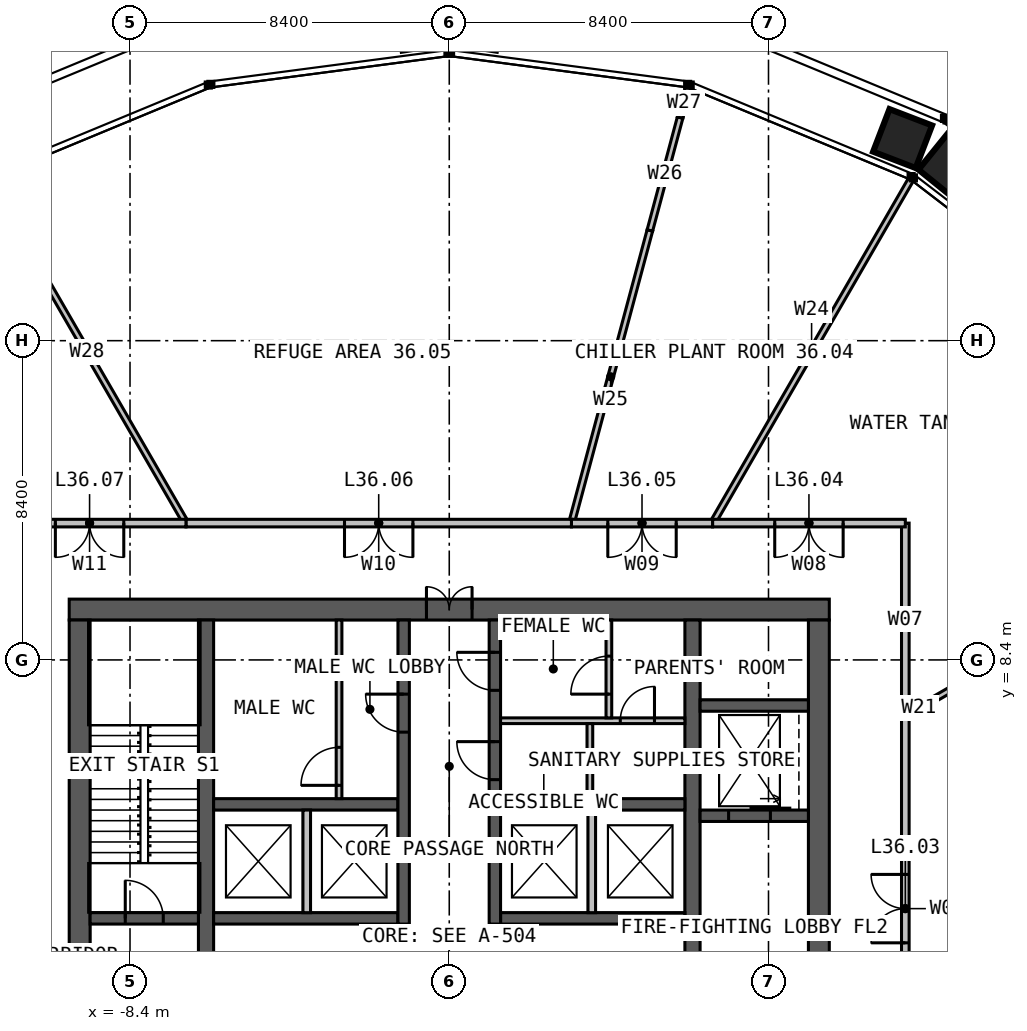
"""IFC4 building model, lengths in metres.
Left out: names, types, materials, properties, quantities, classifications, styles, units other than length and angle.
Written with IfcOpenShell. Run it as: python <this file> out.ifc"""

import sys

from ifc_helpers import new_model, si_unit, direction, frame, frame_2d, origin, place, context, subcontext, project, spatial, rectangle, extrude, element, fill, save


model = new_model("IFC4")
c1 = context("Model", 3, precision=1e-05, world=origin(), true_north=direction((0.0, 1.0)))
c2 = subcontext(c1, "Body", "Model", "MODEL_VIEW")
j1 = project(units=[si_unit("LENGTHUNIT", "METRE"), si_unit("PLANEANGLEUNIT", "RADIAN")], contexts=[c1])
p1 = place(None, origin())
s1 = spatial("IfcSite", under=j1, at=p1, CompositionType="ELEMENT")
p2 = place(p1, origin())
s2 = spatial("IfcBuilding", under=s1, at=p2, CompositionType="ELEMENT")
p3 = place(p2, frame((0.0, 0.0, 150.0)))
s3 = spatial("IfcBuildingStorey", under=s2, at=p3, CompositionType="ELEMENT", Elevation=150.0)
p4 = place(p3, frame((-10.0, 9.725, 0.0), z_axis=(0.0, 0.0, 1.0), x_axis=(1.0, 0.0, 0.0)))
e1 = element("IfcWall", 1, at=p4, inside=s3, PredefinedType="SOLIDWALL", context=c2, shape_type="SweptSolid", body=[
    extrude(rectangle(XDim=20.0, YDim=0.55, at=frame_2d((10.0, 0.0))), origin(), (0.0, 0.0, 1.0), 5.0),
])
p5 = place(p4, frame((9.4, 0.0, 0.0)))
e2 = element("IfcOpeningElement", 2, at=p5, cuts=e1, PredefinedType="OPENING", context=c2, shape_type="SweptSolid", body=[
    extrude(rectangle(XDim=1.2, YDim=2.2, at=frame_2d((0.6, 1.1))), frame((0.0, 0.285, 0.0), z_axis=(0.0, -1.0, 0.0), x_axis=(1.0, 0.0, 0.0)), (0.0, 0.0, 1.0), 0.57),
])
for number, where, z_axis, x_axis in (
    (3, (9.725, -9.45, 0.0), (0.0, 0.0, 1.0), (0.0, 1.0, 0.0)),
    (4, (-9.725, 9.45, 0.0), (0.0, 0.0, 1.0), (0.0, -1.0, 0.0)),
):
    element("IfcWall", number, at=place(p3, frame(where, z_axis=z_axis, x_axis=x_axis)), inside=s3, PredefinedType="SOLIDWALL", context=c2, shape_type="SweptSolid", body=[
        extrude(rectangle(XDim=18.9, YDim=0.55, at=frame_2d((9.45, 0.0))), origin(), (0.0, 0.0, 1.0), 5.0),
    ])
p6 = place(p3, frame((-6.4, -9.45, 0.0), z_axis=(0.0, 0.0, 1.0), x_axis=(0.0, 1.0, 0.0)))
e5 = element("IfcWall", 5, at=p6, inside=s3, PredefinedType="SOLIDWALL", context=c2, shape_type="SweptSolid", body=[
    extrude(rectangle(XDim=18.9, YDim=0.4, at=frame_2d((9.45, 0.0))), origin(), (0.0, 0.0, 1.0), 5.0),
])
p7 = place(p6, frame((8.95, 0.0, 0.0)))
e6 = element("IfcOpeningElement", 6, at=p7, cuts=e5, PredefinedType="OPENING", context=c2, shape_type="SweptSolid", body=[
    extrude(rectangle(XDim=1.0, YDim=2.2, at=frame_2d((0.5, 1.1))), frame((0.0, 0.21, 0.0), z_axis=(0.0, -1.0, 0.0), x_axis=(1.0, 0.0, 0.0)), (0.0, 0.0, 1.0), 0.42),
])
p8 = place(p3, frame((6.4, 9.45, 0.0), z_axis=(0.0, 0.0, 1.0), x_axis=(0.0, -1.0, 0.0)))
e7 = element("IfcWall", 7, at=p8, inside=s3, PredefinedType="SOLIDWALL", context=c2, shape_type="SweptSolid", body=[
    extrude(rectangle(XDim=18.9, YDim=0.4, at=frame_2d((9.45, 0.0))), origin(), (0.0, 0.0, 1.0), 5.0),
])
p9 = place(p8, frame((8.95, 0.0, 0.0)))
e8 = element("IfcOpeningElement", 8, at=p9, cuts=e7, PredefinedType="OPENING", context=c2, shape_type="SweptSolid", body=[
    extrude(rectangle(XDim=1.0, YDim=2.2, at=frame_2d((0.5, 1.1))), frame((0.0, 0.21, 0.0), z_axis=(0.0, -1.0, 0.0), x_axis=(1.0, 0.0, 0.0)), (0.0, 0.0, 1.0), 0.42),
])
for number, where, z_axis, x_axis in (
    (9, (-6.2, 1.6, 0.0), (0.0, 0.0, 1.0), (1.0, 0.0, 0.0)),
    (10, (1.35, 1.6, 0.0), (0.0, 0.0, 1.0), (1.0, 0.0, 0.0)),
    (11, (-6.2, 4.6, 0.0), (0.0, 0.0, 1.0), (1.0, 0.0, 0.0)),
    (12, (1.35, 4.6, 0.0), (0.0, 0.0, 1.0), (1.0, 0.0, 0.0)),
):
    element("IfcWall", number, at=place(p3, frame(where, z_axis=z_axis, x_axis=x_axis)), inside=s3, PredefinedType="SOLIDWALL", context=c2, shape_type="SweptSolid", body=[
        extrude(rectangle(XDim=4.85, YDim=0.3, at=frame_2d((2.425, 0.0))), origin(), (0.0, 0.0, 1.0), 5.0),
    ])
p10 = place(p3, frame((-1.2, 1.45, 0.0), z_axis=(0.0, 0.0, 1.0), x_axis=(0.0, 1.0, 0.0)))
e13 = element("IfcWall", 13, at=p10, inside=s3, PredefinedType="SOLIDWALL", context=c2, shape_type="SweptSolid", body=[
    extrude(rectangle(XDim=8.0, YDim=0.3, at=frame_2d((4.0, 0.0))), origin(), (0.0, 0.0, 1.0), 5.0),
])
p11 = place(p10, frame((5.05, 0.0, 0.0)))
e14 = element("IfcOpeningElement", 14, at=p11, cuts=e13, PredefinedType="OPENING", context=c2, shape_type="SweptSolid", body=[
    extrude(rectangle(XDim=1.0, YDim=2.2, at=frame_2d((0.5, 1.1))), frame((0.0, 0.16, 0.0), z_axis=(0.0, -1.0, 0.0), x_axis=(1.0, 0.0, 0.0)), (0.0, 0.0, 1.0), 0.32),
])
p12 = place(p3, frame((1.2, 1.45, 0.0), z_axis=(0.0, 0.0, 1.0), x_axis=(0.0, 1.0, 0.0)))
e15 = element("IfcWall", 15, at=p12, inside=s3, PredefinedType="SOLIDWALL", context=c2, shape_type="SweptSolid", body=[
    extrude(rectangle(XDim=8.0, YDim=0.3, at=frame_2d((4.0, 0.0))), origin(), (0.0, 0.0, 1.0), 5.0),
])
p13 = place(p12, frame((3.8, 0.0, 0.0)))
e16 = element("IfcOpeningElement", 16, at=p13, cuts=e15, PredefinedType="OPENING", context=c2, shape_type="SweptSolid", body=[
    extrude(rectangle(XDim=1.0, YDim=2.2, at=frame_2d((0.5, 1.1))), frame((0.0, 0.16, 0.0), z_axis=(0.0, -1.0, 0.0), x_axis=(1.0, 0.0, 0.0)), (0.0, 0.0, 1.0), 0.32),
])
p14 = place(p12, frame((6.15, 0.0, 0.0)))
e17 = element("IfcOpeningElement", 17, at=p14, cuts=e15, PredefinedType="OPENING", context=c2, shape_type="SweptSolid", body=[
    extrude(rectangle(XDim=1.0, YDim=2.2, at=frame_2d((0.5, 1.1))), frame((0.0, 0.16, 0.0), z_axis=(0.0, -1.0, 0.0), x_axis=(1.0, 0.0, 0.0)), (0.0, 0.0, 1.0), 0.32),
])
p15 = place(p3, frame((-9.45, 1.6, 0.0), z_axis=(0.0, 0.0, 1.0), x_axis=(1.0, 0.0, 0.0)))
e18 = element("IfcWall", 18, at=p15, inside=s3, PredefinedType="SOLIDWALL", context=c2, shape_type="SweptSolid", body=[
    extrude(rectangle(XDim=2.85, YDim=0.3, at=frame_2d((1.425, 0.0))), origin(), (0.0, 0.0, 1.0), 5.0),
])
p16 = place(p15, frame((0.925, 0.0, 0.0)))
e19 = element("IfcOpeningElement", 19, at=p16, cuts=e18, PredefinedType="OPENING", context=c2, shape_type="SweptSolid", body=[
    extrude(rectangle(XDim=1.0, YDim=2.2, at=frame_2d((0.5, 1.1))), frame((0.0, 0.16, 0.0), z_axis=(0.0, -1.0, 0.0), x_axis=(1.0, 0.0, 0.0)), (0.0, 0.0, 1.0), 0.32),
])
p17 = place(p3, frame((6.6, 4.3, 0.0), z_axis=(0.0, 0.0, 1.0), x_axis=(1.0, 0.0, 0.0)))
e20 = element("IfcWall", 20, at=p17, inside=s3, PredefinedType="SOLIDWALL", context=c2, shape_type="SweptSolid", body=[
    extrude(rectangle(XDim=2.85, YDim=0.3, at=frame_2d((1.425, 0.0))), origin(), (0.0, 0.0, 1.0), 5.0),
])
p18 = place(p17, frame((0.75, 0.0, 0.0)))
e21 = element("IfcOpeningElement", 21, at=p18, cuts=e20, PredefinedType="OPENING", context=c2, shape_type="SweptSolid", body=[
    extrude(rectangle(XDim=1.1, YDim=2.2, at=frame_2d((0.55, 1.1))), frame((0.0, 0.16, 0.0), z_axis=(0.0, -1.0, 0.0), x_axis=(1.0, 0.0, 0.0)), (0.0, 0.0, 1.0), 0.32),
])
p19 = place(p3, frame((6.6, 7.2, 0.0), z_axis=(0.0, 0.0, 1.0), x_axis=(1.0, 0.0, 0.0)))
e22 = element("IfcWall", 22, at=p19, inside=s3, PredefinedType="SOLIDWALL", context=c2, shape_type="SweptSolid", body=[
    extrude(rectangle(XDim=2.85, YDim=0.3, at=frame_2d((1.425, 0.0))), origin(), (0.0, 0.0, 1.0), 5.0),
])
for number, where, z_axis, x_axis in (
    (23, (-3.75, 1.75, 0.0), (0.0, 0.0, 1.0), (0.0, 1.0, 0.0)),
    (24, (3.75, 1.75, 0.0), (0.0, 0.0, 1.0), (0.0, 1.0, 0.0)),
):
    element("IfcWall", number, at=place(p3, frame(where, z_axis=z_axis, x_axis=x_axis)), inside=s3, PredefinedType="SOLIDWALL", context=c2, shape_type="SweptSolid", body=[
        extrude(rectangle(XDim=2.7, YDim=0.2, at=frame_2d((1.35, 0.0))), origin(), (0.0, 0.0, 1.0), 4.75),
    ])
p20 = place(p3, frame((1.35, 6.8, 0.0), z_axis=(0.0, 0.0, 1.0), x_axis=(1.0, 0.0, 0.0)))
e25 = element("IfcWall", 25, at=p20, inside=s3, PredefinedType="PARTITIONING", context=c2, shape_type="SweptSolid", body=[
    extrude(rectangle(XDim=4.85, YDim=0.15, at=frame_2d((2.425, 0.0))), origin(), (0.0, 0.0, 1.0), 4.75),
])
p21 = place(p20, frame((3.15, 0.0, 0.0)))
e26 = element("IfcOpeningElement", 26, at=p21, cuts=e25, PredefinedType="OPENING", context=c2, shape_type="SweptSolid", body=[
    extrude(rectangle(XDim=0.9, YDim=2.2, at=frame_2d((0.45, 1.1))), frame((0.0, 0.085, 0.0), z_axis=(0.0, -1.0, 0.0), x_axis=(1.0, 0.0, 0.0)), (0.0, 0.0, 1.0), 0.17),
])
p22 = place(p3, frame((3.7, 4.75, 0.0), z_axis=(0.0, 0.0, 1.0), x_axis=(0.0, 1.0, 0.0)))
e27 = element("IfcWall", 27, at=p22, inside=s3, PredefinedType="PARTITIONING", context=c2, shape_type="SweptSolid", body=[
    extrude(rectangle(XDim=1.975, YDim=0.15, at=frame_2d((0.988, 0.0))), origin(), (0.0, 0.0, 1.0), 4.75),
])
p23 = place(p3, frame((4.2, 6.875, 0.0), z_axis=(0.0, 0.0, 1.0), x_axis=(0.0, 1.0, 0.0)))
e28 = element("IfcWall", 28, at=p23, inside=s3, PredefinedType="PARTITIONING", context=c2, shape_type="SweptSolid", body=[
    extrude(rectangle(XDim=2.575, YDim=0.15, at=frame_2d((1.288, 0.0))), origin(), (0.0, 0.0, 1.0), 4.75),
])
p24 = place(p23, frame((0.625, 0.0, 0.0)))
e29 = element("IfcOpeningElement", 29, at=p24, cuts=e28, PredefinedType="OPENING", context=c2, shape_type="SweptSolid", body=[
    extrude(rectangle(XDim=1.0, YDim=2.2, at=frame_2d((0.5, 1.1))), frame((0.0, 0.085, 0.0), z_axis=(0.0, -1.0, 0.0), x_axis=(1.0, 0.0, 0.0)), (0.0, 0.0, 1.0), 0.17),
])
p25 = place(p3, frame((-2.9, 4.75, 0.0), z_axis=(0.0, 0.0, 1.0), x_axis=(0.0, 1.0, 0.0)))
e30 = element("IfcWall", 30, at=p25, inside=s3, PredefinedType="PARTITIONING", context=c2, shape_type="SweptSolid", body=[
    extrude(rectangle(XDim=4.7, YDim=0.15, at=frame_2d((2.35, 0.0))), origin(), (0.0, 0.0, 1.0), 4.75),
])
p26 = place(p25, frame((0.35, 0.0, 0.0)))
e31 = element("IfcOpeningElement", 31, at=p26, cuts=e30, PredefinedType="OPENING", context=c2, shape_type="SweptSolid", body=[
    extrude(rectangle(XDim=1.0, YDim=2.2, at=frame_2d((0.5, 1.1))), frame((0.0, 0.085, 0.0), z_axis=(0.0, -1.0, 0.0), x_axis=(1.0, 0.0, 0.0)), (0.0, 0.0, 1.0), 0.17),
])
p27 = place(p3, frame((12.0, 6.928, 0.0), z_axis=(0.0, 0.0, 1.0), x_axis=(0.86608282171, 0.499900536046, 0.0)))
e32 = element("IfcWall", 32, at=p27, inside=s3, PredefinedType="PARTITIONING", context=c2, shape_type="SweptSolid", body=[
    extrude(rectangle(XDim=0.831, YDim=0.15, at=frame_2d((0.416, 0.0))), origin(), (0.0, 0.0, 1.0), 4.8),
])
p28 = place(p3, frame((12.719, 7.344, 0.0), z_axis=(0.0, 0.0, 1.0), x_axis=(0.866002361659, 0.500039908008, 0.0)))
e33 = element("IfcWall", 33, at=p28, inside=s3, PredefinedType="PARTITIONING", context=c2, shape_type="SweptSolid", body=[
    extrude(rectangle(XDim=2.618, YDim=0.15, at=frame_2d((1.309, 0.0))), origin(), (0.0, 0.0, 1.0), 3.79),
])
p29 = place(p3, frame((6.928, 12.0, 0.0), z_axis=(0.0, 0.0, 1.0), x_axis=(0.500003616288, 0.866023315909, 0.0)))
e34 = element("IfcWall", 34, at=p29, inside=s3, PredefinedType="PARTITIONING", context=c2, shape_type="SweptSolid", body=[
    extrude(rectangle(XDim=10.423, YDim=0.15, at=frame_2d((5.211, 0.0))), origin(), (0.0, 0.0, 1.0), 4.8),
])
p30 = place(p3, frame((3.215, 12.0, 0.0), z_axis=(0.0, 0.0, 1.0), x_axis=(0.258826894995, 0.965923722882, 0.0)))
e35 = element("IfcWall", 35, at=p30, inside=s3, PredefinedType="PARTITIONING", context=c2, shape_type="SweptSolid", body=[
    extrude(rectangle(XDim=7.973, YDim=0.15, at=frame_2d((3.987, 0.0))), origin(), (0.0, 0.0, 1.0), 4.8),
])
p31 = place(p3, frame((5.279, 19.702, 0.0), z_axis=(0.0, 0.0, 1.0), x_axis=(0.258819472716, 0.96592571171, 0.0)))
e36 = element("IfcWall", 36, at=p31, inside=s3, PredefinedType="PARTITIONING", context=c2, shape_type="SweptSolid", body=[
    extrude(rectangle(XDim=3.073, YDim=0.15, at=frame_2d((1.537, 0.0))), origin(), (0.0, 0.0, 1.0), 3.79),
])
p32 = place(p3, frame((6.074, 22.67, 0.0), z_axis=(0.0, 0.0, 1.0), x_axis=(0.258826555959, 0.96592381373, 0.0)))
e37 = element("IfcWall", 37, at=p32, inside=s3, PredefinedType="PARTITIONING", context=c2, shape_type="SweptSolid", body=[
    extrude(rectangle(XDim=0.809, YDim=0.15, at=frame_2d((0.405, 0.0))), origin(), (0.0, 0.0, 1.0), 4.8),
])
p33 = place(p3, frame((-6.928, 12.0, 0.0), z_axis=(0.0, 0.0, 1.0), x_axis=(-0.500003616288, 0.866023315909, 0.0)))
e38 = element("IfcWall", 38, at=p33, inside=s3, PredefinedType="PARTITIONING", context=c2, shape_type="SweptSolid", body=[
    extrude(rectangle(XDim=10.423, YDim=0.15, at=frame_2d((5.211, 0.0))), origin(), (0.0, 0.0, 1.0), 4.8),
])
p34 = place(p3, frame((12.0, -3.215, 0.0), z_axis=(0.0, 0.0, 1.0), x_axis=(0.0, 1.0, 0.0)))
e39 = element("IfcWall", 39, at=p34, inside=s3, PredefinedType="PARTITIONING", context=c2, shape_type="SweptSolid", body=[
    extrude(rectangle(XDim=10.144, YDim=0.2, at=frame_2d((5.072, 0.0))), origin(), (0.0, 0.0, 1.0), 4.8),
])
p35 = place(p34, frame((4.172, 0.0, 0.0)))
e40 = element("IfcOpeningElement", 40, at=p35, cuts=e39, PredefinedType="OPENING", context=c2, shape_type="SweptSolid", body=[
    extrude(rectangle(XDim=1.8, YDim=2.2, at=frame_2d((0.9, 1.1))), frame((0.0, 0.11, 0.0), z_axis=(0.0, -1.0, 0.0), x_axis=(1.0, 0.0, 0.0)), (0.0, 0.0, 1.0), 0.22),
])
p36 = place(p3, frame((12.0, 6.928, 0.0), z_axis=(0.0, 0.0, 1.0), x_axis=(0.0, 1.0, 0.0)))
e41 = element("IfcWall", 41, at=p36, inside=s3, PredefinedType="PARTITIONING", context=c2, shape_type="SweptSolid", body=[
    extrude(rectangle(XDim=5.072, YDim=0.2, at=frame_2d((2.536, 0.0))), origin(), (0.0, 0.0, 1.0), 4.8),
])
p37 = place(p3, frame((12.0, 12.0, 0.0), z_axis=(0.0, 0.0, 1.0), x_axis=(-1.0, 0.0, 0.0)))
e42 = element("IfcWall", 42, at=p37, inside=s3, PredefinedType="PARTITIONING", context=c2, shape_type="SweptSolid", body=[
    extrude(rectangle(XDim=5.072, YDim=0.2, at=frame_2d((2.536, 0.0))), origin(), (0.0, 0.0, 1.0), 4.8),
])
p38 = place(p37, frame((1.636, 0.0, 0.0)))
e43 = element("IfcOpeningElement", 43, at=p38, cuts=e42, PredefinedType="OPENING", context=c2, shape_type="SweptSolid", body=[
    extrude(rectangle(XDim=1.8, YDim=2.2, at=frame_2d((0.9, 1.1))), frame((0.0, 0.11, 0.0), z_axis=(0.0, -1.0, 0.0), x_axis=(1.0, 0.0, 0.0)), (0.0, 0.0, 1.0), 0.22),
])
p39 = place(p3, frame((6.928, 12.0, 0.0), z_axis=(0.0, 0.0, 1.0), x_axis=(-1.0, 0.0, 0.0)))
e44 = element("IfcWall", 44, at=p39, inside=s3, PredefinedType="PARTITIONING", context=c2, shape_type="SweptSolid", body=[
    extrude(rectangle(XDim=3.713, YDim=0.2, at=frame_2d((1.856, 0.0))), origin(), (0.0, 0.0, 1.0), 4.8),
])
p40 = place(p39, frame((0.956, 0.0, 0.0)))
e45 = element("IfcOpeningElement", 45, at=p40, cuts=e44, PredefinedType="OPENING", context=c2, shape_type="SweptSolid", body=[
    extrude(rectangle(XDim=1.8, YDim=2.2, at=frame_2d((0.9, 1.1))), frame((0.0, 0.11, 0.0), z_axis=(0.0, -1.0, 0.0), x_axis=(1.0, 0.0, 0.0)), (0.0, 0.0, 1.0), 0.22),
])
p41 = place(p3, frame((3.215, 12.0, 0.0), z_axis=(0.0, 0.0, 1.0), x_axis=(-1.0, 0.0, 0.0)))
e46 = element("IfcWall", 46, at=p41, inside=s3, PredefinedType="PARTITIONING", context=c2, shape_type="SweptSolid", body=[
    extrude(rectangle(XDim=10.144, YDim=0.2, at=frame_2d((5.072, 0.0))), origin(), (0.0, 0.0, 1.0), 4.8),
])
p42 = place(p41, frame((4.172, 0.0, 0.0)))
e47 = element("IfcOpeningElement", 47, at=p42, cuts=e46, PredefinedType="OPENING", context=c2, shape_type="SweptSolid", body=[
    extrude(rectangle(XDim=1.8, YDim=2.2, at=frame_2d((0.9, 1.1))), frame((0.0, 0.11, 0.0), z_axis=(0.0, -1.0, 0.0), x_axis=(1.0, 0.0, 0.0)), (0.0, 0.0, 1.0), 0.22),
])
p43 = place(p3, frame((-6.928, 12.0, 0.0), z_axis=(0.0, 0.0, 1.0), x_axis=(-1.0, 0.0, 0.0)))
e48 = element("IfcWall", 48, at=p43, inside=s3, PredefinedType="PARTITIONING", context=c2, shape_type="SweptSolid", body=[
    extrude(rectangle(XDim=5.072, YDim=0.2, at=frame_2d((2.536, 0.0))), origin(), (0.0, 0.0, 1.0), 4.8),
])
p44 = place(p43, frame((1.636, 0.0, 0.0)))
e49 = element("IfcOpeningElement", 49, at=p44, cuts=e48, PredefinedType="OPENING", context=c2, shape_type="SweptSolid", body=[
    extrude(rectangle(XDim=1.8, YDim=2.2, at=frame_2d((0.9, 1.1))), frame((0.0, 0.11, 0.0), z_axis=(0.0, -1.0, 0.0), x_axis=(1.0, 0.0, 0.0)), (0.0, 0.0, 1.0), 0.22),
])
p45 = place(p5, origin())
e50 = element("IfcDoor", 50, at=p45, inside=s3, OperationType="DOUBLE_DOOR_SINGLE_SWING", PredefinedType="DOOR", context=c2, shape_type="SweptSolid", body=[
    extrude(rectangle(XDim=1.2, YDim=2.2, at=frame_2d((0.6, 1.1))), frame((0.0, 0.025, 0.0), z_axis=(0.0, -1.0, 0.0), x_axis=(1.0, 0.0, 0.0)), (0.0, 0.0, 1.0), 0.05),
])
fill(e2, e50)
p46 = place(p16, origin())
e51 = element("IfcDoor", 51, at=p46, inside=s3, OperationType="SINGLE_SWING_LEFT", PredefinedType="DOOR", context=c2, shape_type="SweptSolid", body=[
    extrude(rectangle(XDim=1.0, YDim=2.2, at=frame_2d((0.5, 1.1))), frame((0.0, 0.025, 0.0), z_axis=(0.0, -1.0, 0.0), x_axis=(1.0, 0.0, 0.0)), (0.0, 0.0, 1.0), 0.05),
])
fill(e19, e51)
p47 = place(p11, origin())
e52 = element("IfcDoor", 52, at=p47, inside=s3, OperationType="SINGLE_SWING_RIGHT", PredefinedType="DOOR", context=c2, shape_type="SweptSolid", body=[
    extrude(rectangle(XDim=1.0, YDim=2.2, at=frame_2d((0.5, 1.1))), frame((0.0, 0.025, 0.0), z_axis=(0.0, -1.0, 0.0), x_axis=(1.0, 0.0, 0.0)), (0.0, 0.0, 1.0), 0.05),
])
fill(e14, e52)
p48 = place(p13, origin())
e53 = element("IfcDoor", 53, at=p48, inside=s3, OperationType="SINGLE_SWING_RIGHT", PredefinedType="DOOR", context=c2, shape_type="SweptSolid", body=[
    extrude(rectangle(XDim=1.0, YDim=2.2, at=frame_2d((0.5, 1.1))), frame((0.0, 0.025, 0.0), z_axis=(0.0, -1.0, 0.0), x_axis=(1.0, 0.0, 0.0)), (0.0, 0.0, 1.0), 0.05),
])
fill(e16, e53)
p49 = place(p14, origin())
e54 = element("IfcDoor", 54, at=p49, inside=s3, OperationType="SINGLE_SWING_RIGHT", PredefinedType="DOOR", context=c2, shape_type="SweptSolid", body=[
    extrude(rectangle(XDim=1.0, YDim=2.2, at=frame_2d((0.5, 1.1))), frame((0.0, 0.025, 0.0), z_axis=(0.0, -1.0, 0.0), x_axis=(1.0, 0.0, 0.0)), (0.0, 0.0, 1.0), 0.05),
])
fill(e17, e54)
p50 = place(p21, origin())
e55 = element("IfcDoor", 55, at=p50, inside=s3, OperationType="SINGLE_SWING_RIGHT", PredefinedType="DOOR", context=c2, shape_type="SweptSolid", body=[
    extrude(rectangle(XDim=0.9, YDim=2.2, at=frame_2d((0.45, 1.1))), frame((0.0, 0.025, 0.0), z_axis=(0.0, -1.0, 0.0), x_axis=(1.0, 0.0, 0.0)), (0.0, 0.0, 1.0), 0.05),
])
fill(e26, e55)
p51 = place(p24, origin())
e56 = element("IfcDoor", 56, at=p51, inside=s3, OperationType="SINGLE_SWING_LEFT", PredefinedType="DOOR", context=c2, shape_type="SweptSolid", body=[
    extrude(rectangle(XDim=1.0, YDim=2.2, at=frame_2d((0.5, 1.1))), frame((0.0, 0.025, 0.0), z_axis=(0.0, -1.0, 0.0), x_axis=(1.0, 0.0, 0.0)), (0.0, 0.0, 1.0), 0.05),
])
fill(e29, e56)
p52 = place(p26, origin())
e57 = element("IfcDoor", 57, at=p52, inside=s3, OperationType="SINGLE_SWING_LEFT", PredefinedType="DOOR", context=c2, shape_type="SweptSolid", body=[
    extrude(rectangle(XDim=1.0, YDim=2.2, at=frame_2d((0.5, 1.1))), frame((0.0, 0.025, 0.0), z_axis=(0.0, -1.0, 0.0), x_axis=(1.0, 0.0, 0.0)), (0.0, 0.0, 1.0), 0.05),
])
fill(e31, e57)
p53 = place(p18, origin())
e58 = element("IfcDoor", 58, at=p53, inside=s3, OperationType="SLIDING_TO_LEFT", PredefinedType="DOOR", context=c2, shape_type="SweptSolid", body=[
    extrude(rectangle(XDim=1.1, YDim=2.2, at=frame_2d((0.55, 1.1))), frame((0.0, 0.025, 0.0), z_axis=(0.0, -1.0, 0.0), x_axis=(1.0, 0.0, 0.0)), (0.0, 0.0, 1.0), 0.05),
])
fill(e21, e58)
p54 = place(p35, origin())
e59 = element("IfcDoor", 59, at=p54, inside=s3, OperationType="DOUBLE_DOOR_SINGLE_SWING", PredefinedType="DOOR", context=c2, shape_type="SweptSolid", body=[
    extrude(rectangle(XDim=1.8, YDim=2.2, at=frame_2d((0.9, 1.1))), frame((0.0, 0.025, 0.0), z_axis=(0.0, -1.0, 0.0), x_axis=(1.0, 0.0, 0.0)), (0.0, 0.0, 1.0), 0.05),
])
fill(e40, e59)
p55 = place(p38, origin())
e60 = element("IfcDoor", 60, at=p55, inside=s3, OperationType="DOUBLE_DOOR_SINGLE_SWING", PredefinedType="DOOR", context=c2, shape_type="SweptSolid", body=[
    extrude(rectangle(XDim=1.8, YDim=2.2, at=frame_2d((0.9, 1.1))), frame((0.0, 0.025, 0.0), z_axis=(0.0, -1.0, 0.0), x_axis=(1.0, 0.0, 0.0)), (0.0, 0.0, 1.0), 0.05),
])
fill(e43, e60)
p56 = place(p40, origin())
e61 = element("IfcDoor", 61, at=p56, inside=s3, OperationType="DOUBLE_DOOR_SINGLE_SWING", PredefinedType="DOOR", context=c2, shape_type="SweptSolid", body=[
    extrude(rectangle(XDim=1.8, YDim=2.2, at=frame_2d((0.9, 1.1))), frame((0.0, 0.025, 0.0), z_axis=(0.0, -1.0, 0.0), x_axis=(1.0, 0.0, 0.0)), (0.0, 0.0, 1.0), 0.05),
])
fill(e45, e61)
p57 = place(p42, origin())
e62 = element("IfcDoor", 62, at=p57, inside=s3, OperationType="DOUBLE_DOOR_SINGLE_SWING", PredefinedType="DOOR", context=c2, shape_type="SweptSolid", body=[
    extrude(rectangle(XDim=1.8, YDim=2.2, at=frame_2d((0.9, 1.1))), frame((0.0, 0.025, 0.0), z_axis=(0.0, -1.0, 0.0), x_axis=(1.0, 0.0, 0.0)), (0.0, 0.0, 1.0), 0.05),
])
fill(e47, e62)
p58 = place(p44, origin())
e63 = element("IfcDoor", 63, at=p58, inside=s3, OperationType="DOUBLE_DOOR_SINGLE_SWING", PredefinedType="DOOR", context=c2, shape_type="SweptSolid", body=[
    extrude(rectangle(XDim=1.8, YDim=2.2, at=frame_2d((0.9, 1.1))), frame((0.0, 0.025, 0.0), z_axis=(0.0, -1.0, 0.0), x_axis=(1.0, 0.0, 0.0)), (0.0, 0.0, 1.0), 0.05),
])
fill(e49, e63)
save(model, sys.argv[1])
